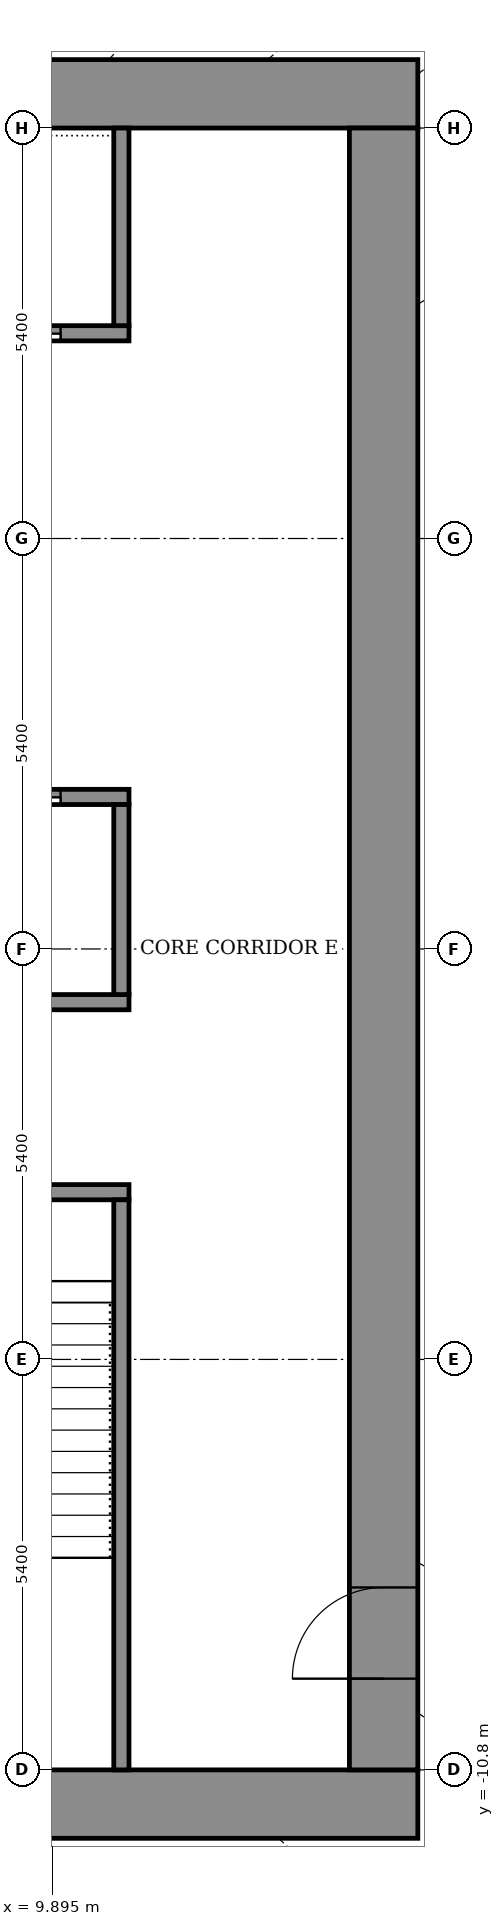
"""IFC4 building model, lengths in metres.
Left out: names, types, materials, properties, quantities, classifications, styles, units other than length and angle.
Written with IfcOpenShell. Run it as: python <this file> out.ifc"""

import sys

from ifc_helpers import new_model, si_unit, direction, frame, frame_2d, origin, place, context, subcontext, project, spatial, rectangle, extrude, element, fill, save


model = new_model("IFC4")
c1 = context("Model", 3, precision=1e-05, world=origin(), true_north=direction((0.0, 1.0)))
c2 = subcontext(c1, "Body", "Model", "MODEL_VIEW")
j1 = project(units=[si_unit("LENGTHUNIT", "METRE"), si_unit("PLANEANGLEUNIT", "RADIAN")], contexts=[c1])
p1 = place(None, origin())
s1 = spatial("IfcSite", under=j1, at=p1, CompositionType="ELEMENT")
p2 = place(p1, origin())
s2 = spatial("IfcBuilding", under=s1, at=p2, CompositionType="ELEMENT")
p3 = place(p2, frame((0.0, 0.0, 170.7)))
s3 = spatial("IfcBuildingStorey", under=s2, at=p3, CompositionType="ELEMENT", Elevation=170.7)
for number, where, z_axis, x_axis in (
    (1, (-14.7, -11.25, 0.0), (0.0, 0.0, 1.0), (1.0, 0.0, 0.0)),
    (2, (-14.7, 11.25, 0.0), (0.0, 0.0, 1.0), (1.0, 0.0, 0.0)),
):
    element("IfcWall", number, at=place(p3, frame(where, z_axis=z_axis, x_axis=x_axis)), inside=s3, PredefinedType="SHEAR", context=c2, shape_type="SweptSolid", body=[
        extrude(rectangle(XDim=29.4, YDim=0.9, at=frame_2d((14.7, 0.0))), origin(), (0.0, 0.0, 1.0), 4.6),
    ])
p4 = place(p3, frame((14.25, -10.8, 0.0), z_axis=(0.0, 0.0, 1.0), x_axis=(0.0, 1.0, 0.0)))
e3 = element("IfcWall", 3, at=p4, inside=s3, PredefinedType="SHEAR", context=c2, shape_type="SweptSolid", body=[
    extrude(rectangle(XDim=21.6, YDim=0.9, at=frame_2d((10.8, 0.0))), origin(), (0.0, 0.0, 1.0), 4.6),
])
p5 = place(p4, frame((1.2, 0.0, 0.0)))
e4 = element("IfcOpeningElement", 4, at=p5, cuts=e3, PredefinedType="OPENING", context=c2, shape_type="SweptSolid", body=[
    extrude(rectangle(XDim=1.2, YDim=2.1, at=frame_2d((0.6, 1.05))), frame((0.0, 0.46, 0.0), z_axis=(0.0, -1.0, 0.0), x_axis=(1.0, 0.0, 0.0)), (0.0, 0.0, 1.0), 0.92),
])
p6 = place(p3, frame((-10.9, -3.2, 0.0), z_axis=(0.0, 0.0, 1.0), x_axis=(1.0, 0.0, 0.0)))
e5 = element("IfcWall", 5, at=p6, inside=s3, PredefinedType="SHEAR", context=c2, shape_type="SweptSolid", body=[
    extrude(rectangle(XDim=21.8, YDim=0.2, at=frame_2d((10.9, 0.0))), origin(), (0.0, 0.0, 1.0), 4.05),
])
p7 = place(p6, frame((1.075, 0.0, 0.0)))
e6 = element("IfcOpeningElement", 6, at=p7, cuts=e5, PredefinedType="OPENING", context=c2, shape_type="SweptSolid", body=[
    extrude(rectangle(XDim=1.1, YDim=2.1, at=frame_2d((0.55, 1.05))), frame((0.0, 0.11, 0.0), z_axis=(0.0, -1.0, 0.0), x_axis=(1.0, 0.0, 0.0)), (0.0, 0.0, 1.0), 0.22),
])
p8 = place(p6, frame((10.325, 0.0, 0.0)))
e7 = element("IfcOpeningElement", 7, at=p8, cuts=e5, PredefinedType="OPENING", context=c2, shape_type="SweptSolid", body=[
    extrude(rectangle(XDim=1.1, YDim=2.1, at=frame_2d((0.55, 1.05))), frame((0.0, 0.11, 0.0), z_axis=(0.0, -1.0, 0.0), x_axis=(1.0, 0.0, 0.0)), (0.0, 0.0, 1.0), 0.22),
])
p9 = place(p6, frame((19.625, 0.0, 0.0)))
e8 = element("IfcOpeningElement", 8, at=p9, cuts=e5, PredefinedType="OPENING", context=c2, shape_type="SweptSolid", body=[
    extrude(rectangle(XDim=1.1, YDim=2.1, at=frame_2d((0.55, 1.05))), frame((0.0, 0.11, 0.0), z_axis=(0.0, -1.0, 0.0), x_axis=(1.0, 0.0, 0.0)), (0.0, 0.0, 1.0), 0.22),
])
p10 = place(p6, frame((5.7, 0.0, 0.0)))
e9 = element("IfcOpeningElement", 9, at=p10, cuts=e5, PredefinedType="OPENING", context=c2, shape_type="SweptSolid", body=[
    extrude(rectangle(XDim=1.1, YDim=2.1, at=frame_2d((0.55, 1.05))), frame((0.0, 0.11, 0.0), z_axis=(0.0, -1.0, 0.0), x_axis=(1.0, 0.0, 0.0)), (0.0, 0.0, 1.0), 0.22),
])
p11 = place(p6, frame((14.975, 0.0, 0.0)))
e10 = element("IfcOpeningElement", 10, at=p11, cuts=e5, PredefinedType="OPENING", context=c2, shape_type="SweptSolid", body=[
    extrude(rectangle(XDim=1.1, YDim=2.1, at=frame_2d((0.55, 1.05))), frame((0.0, 0.11, 0.0), z_axis=(0.0, -1.0, 0.0), x_axis=(1.0, 0.0, 0.0)), (0.0, 0.0, 1.0), 0.22),
])
p12 = place(p3, frame((-10.9, -0.7, 0.0), z_axis=(0.0, 0.0, 1.0), x_axis=(1.0, 0.0, 0.0)))
e11 = element("IfcWall", 11, at=p12, inside=s3, PredefinedType="SHEAR", context=c2, shape_type="SweptSolid", body=[
    extrude(rectangle(XDim=21.8, YDim=0.2, at=frame_2d((10.9, 0.0))), origin(), (0.0, 0.0, 1.0), 4.05),
])
p13 = place(p3, frame((-10.9, 2.0, 0.0), z_axis=(0.0, 0.0, 1.0), x_axis=(1.0, 0.0, 0.0)))
e12 = element("IfcWall", 12, at=p13, inside=s3, PredefinedType="SHEAR", context=c2, shape_type="SweptSolid", body=[
    extrude(rectangle(XDim=21.8, YDim=0.2, at=frame_2d((10.9, 0.0))), origin(), (0.0, 0.0, 1.0), 4.05),
])
p14 = place(p13, frame((14.4, 0.0, 0.0)))
e13 = element("IfcOpeningElement", 13, at=p14, cuts=e12, PredefinedType="OPENING", context=c2, shape_type="SweptSolid", body=[
    extrude(rectangle(XDim=1.1, YDim=2.1, at=frame_2d((0.55, 1.05))), frame((0.0, 0.11, 0.0), z_axis=(0.0, -1.0, 0.0), x_axis=(1.0, 0.0, 0.0)), (0.0, 0.0, 1.0), 0.22),
])
p15 = place(p13, frame((17.1, 0.0, 0.0)))
e14 = element("IfcOpeningElement", 14, at=p15, cuts=e12, PredefinedType="OPENING", context=c2, shape_type="SweptSolid", body=[
    extrude(rectangle(XDim=1.1, YDim=2.1, at=frame_2d((0.55, 1.05))), frame((0.0, 0.11, 0.0), z_axis=(0.0, -1.0, 0.0), x_axis=(1.0, 0.0, 0.0)), (0.0, 0.0, 1.0), 0.22),
])
p16 = place(p13, frame((19.8, 0.0, 0.0)))
e15 = element("IfcOpeningElement", 15, at=p16, cuts=e12, PredefinedType="OPENING", context=c2, shape_type="SweptSolid", body=[
    extrude(rectangle(XDim=1.1, YDim=2.1, at=frame_2d((0.55, 1.05))), frame((0.0, 0.11, 0.0), z_axis=(0.0, -1.0, 0.0), x_axis=(1.0, 0.0, 0.0)), (0.0, 0.0, 1.0), 0.22),
])
p17 = place(p13, frame((1.675, 0.0, 0.0)))
e16 = element("IfcOpeningElement", 16, at=p17, cuts=e12, PredefinedType="OPENING", context=c2, shape_type="SweptSolid", body=[
    extrude(rectangle(XDim=0.9, YDim=2.1, at=frame_2d((0.45, 1.05))), frame((0.0, 0.11, 0.0), z_axis=(0.0, -1.0, 0.0), x_axis=(1.0, 0.0, 0.0)), (0.0, 0.0, 1.0), 0.22),
])
p18 = place(p13, frame((8.425, 0.0, 0.0)))
e17 = element("IfcOpeningElement", 17, at=p18, cuts=e12, PredefinedType="OPENING", context=c2, shape_type="SweptSolid", body=[
    extrude(rectangle(XDim=0.9, YDim=2.1, at=frame_2d((0.45, 1.05))), frame((0.0, 0.11, 0.0), z_axis=(0.0, -1.0, 0.0), x_axis=(1.0, 0.0, 0.0)), (0.0, 0.0, 1.0), 0.22),
])
p19 = place(p3, frame((-10.9, 8.1, 0.0), z_axis=(0.0, 0.0, 1.0), x_axis=(1.0, 0.0, 0.0)))
e18 = element("IfcWall", 18, at=p19, inside=s3, PredefinedType="SHEAR", context=c2, shape_type="SweptSolid", body=[
    extrude(rectangle(XDim=21.8, YDim=0.2, at=frame_2d((10.9, 0.0))), origin(), (0.0, 0.0, 1.0), 4.05),
])
p20 = place(p19, frame((14.4, 0.0, 0.0)))
e19 = element("IfcOpeningElement", 19, at=p20, cuts=e18, PredefinedType="OPENING", context=c2, shape_type="SweptSolid", body=[
    extrude(rectangle(XDim=1.1, YDim=2.1, at=frame_2d((0.55, 1.05))), frame((0.0, 0.11, 0.0), z_axis=(0.0, -1.0, 0.0), x_axis=(1.0, 0.0, 0.0)), (0.0, 0.0, 1.0), 0.22),
])
p21 = place(p19, frame((17.1, 0.0, 0.0)))
e20 = element("IfcOpeningElement", 20, at=p21, cuts=e18, PredefinedType="OPENING", context=c2, shape_type="SweptSolid", body=[
    extrude(rectangle(XDim=1.1, YDim=2.1, at=frame_2d((0.55, 1.05))), frame((0.0, 0.11, 0.0), z_axis=(0.0, -1.0, 0.0), x_axis=(1.0, 0.0, 0.0)), (0.0, 0.0, 1.0), 0.22),
])
p22 = place(p19, frame((19.8, 0.0, 0.0)))
e21 = element("IfcOpeningElement", 21, at=p22, cuts=e18, PredefinedType="OPENING", context=c2, shape_type="SweptSolid", body=[
    extrude(rectangle(XDim=1.1, YDim=2.1, at=frame_2d((0.55, 1.05))), frame((0.0, 0.11, 0.0), z_axis=(0.0, -1.0, 0.0), x_axis=(1.0, 0.0, 0.0)), (0.0, 0.0, 1.0), 0.22),
])
p23 = place(p19, frame((1.675, 0.0, 0.0)))
e22 = element("IfcOpeningElement", 22, at=p23, cuts=e18, PredefinedType="OPENING", context=c2, shape_type="SweptSolid", body=[
    extrude(rectangle(XDim=0.9, YDim=2.1, at=frame_2d((0.45, 1.05))), frame((0.0, 0.11, 0.0), z_axis=(0.0, -1.0, 0.0), x_axis=(1.0, 0.0, 0.0)), (0.0, 0.0, 1.0), 0.22),
])
p24 = place(p19, frame((8.425, 0.0, 0.0)))
e23 = element("IfcOpeningElement", 23, at=p24, cuts=e18, PredefinedType="OPENING", context=c2, shape_type="SweptSolid", body=[
    extrude(rectangle(XDim=0.9, YDim=2.1, at=frame_2d((0.45, 1.05))), frame((0.0, 0.11, 0.0), z_axis=(0.0, -1.0, 0.0), x_axis=(1.0, 0.0, 0.0)), (0.0, 0.0, 1.0), 0.22),
])
p25 = place(p3, frame((10.8, -10.8, 0.0), z_axis=(0.0, 0.0, 1.0), x_axis=(0.0, 1.0, 0.0)))
e24 = element("IfcWall", 24, at=p25, inside=s3, PredefinedType="SHEAR", context=c2, shape_type="SweptSolid", body=[
    extrude(rectangle(XDim=7.5, YDim=0.2, at=frame_2d((3.75, 0.0))), origin(), (0.0, 0.0, 1.0), 4.05),
])
p26 = place(p3, frame((10.8, -0.6, 0.0), z_axis=(0.0, 0.0, 1.0), x_axis=(0.0, 1.0, 0.0)))
e25 = element("IfcWall", 25, at=p26, inside=s3, PredefinedType="SHEAR", context=c2, shape_type="SweptSolid", body=[
    extrude(rectangle(XDim=2.5, YDim=0.2, at=frame_2d((1.25, 0.0))), origin(), (0.0, 0.0, 1.0), 4.05),
])
p27 = place(p3, frame((10.8, 8.2, 0.0), z_axis=(0.0, 0.0, 1.0), x_axis=(0.0, 1.0, 0.0)))
e26 = element("IfcWall", 26, at=p27, inside=s3, PredefinedType="SHEAR", context=c2, shape_type="SweptSolid", body=[
    extrude(rectangle(XDim=2.6, YDim=0.2, at=frame_2d((1.3, 0.0))), origin(), (0.0, 0.0, 1.0), 4.05),
])
p28 = place(p5, origin())
e27 = element("IfcDoor", 27, at=p28, inside=s3, OperationType="DOUBLE_DOOR_SINGLE_SWING", PredefinedType="DOOR", context=c2, shape_type="SweptSolid", body=[
    extrude(rectangle(XDim=1.2, YDim=2.1, at=frame_2d((0.6, 1.05))), frame((0.0, 0.025, 0.0), z_axis=(0.0, -1.0, 0.0), x_axis=(1.0, 0.0, 0.0)), (0.0, 0.0, 1.0), 0.05),
])
fill(e4, e27)
p29 = place(p16, origin())
e28 = element("IfcDoor", 28, at=p29, inside=s3, OperationType="SLIDING_TO_LEFT", PredefinedType="DOOR", context=c2, shape_type="SweptSolid", body=[
    extrude(rectangle(XDim=1.1, YDim=2.1, at=frame_2d((0.55, 1.05))), frame((0.0, 0.025, 0.0), z_axis=(0.0, -1.0, 0.0), x_axis=(1.0, 0.0, 0.0)), (0.0, 0.0, 1.0), 0.05),
])
fill(e15, e28)
p30 = place(p22, origin())
e29 = element("IfcDoor", 29, at=p30, inside=s3, OperationType="SLIDING_TO_LEFT", PredefinedType="DOOR", context=c2, shape_type="SweptSolid", body=[
    extrude(rectangle(XDim=1.1, YDim=2.1, at=frame_2d((0.55, 1.05))), frame((0.0, 0.025, 0.0), z_axis=(0.0, -1.0, 0.0), x_axis=(1.0, 0.0, 0.0)), (0.0, 0.0, 1.0), 0.05),
])
fill(e21, e29)
save(model, sys.argv[1])
